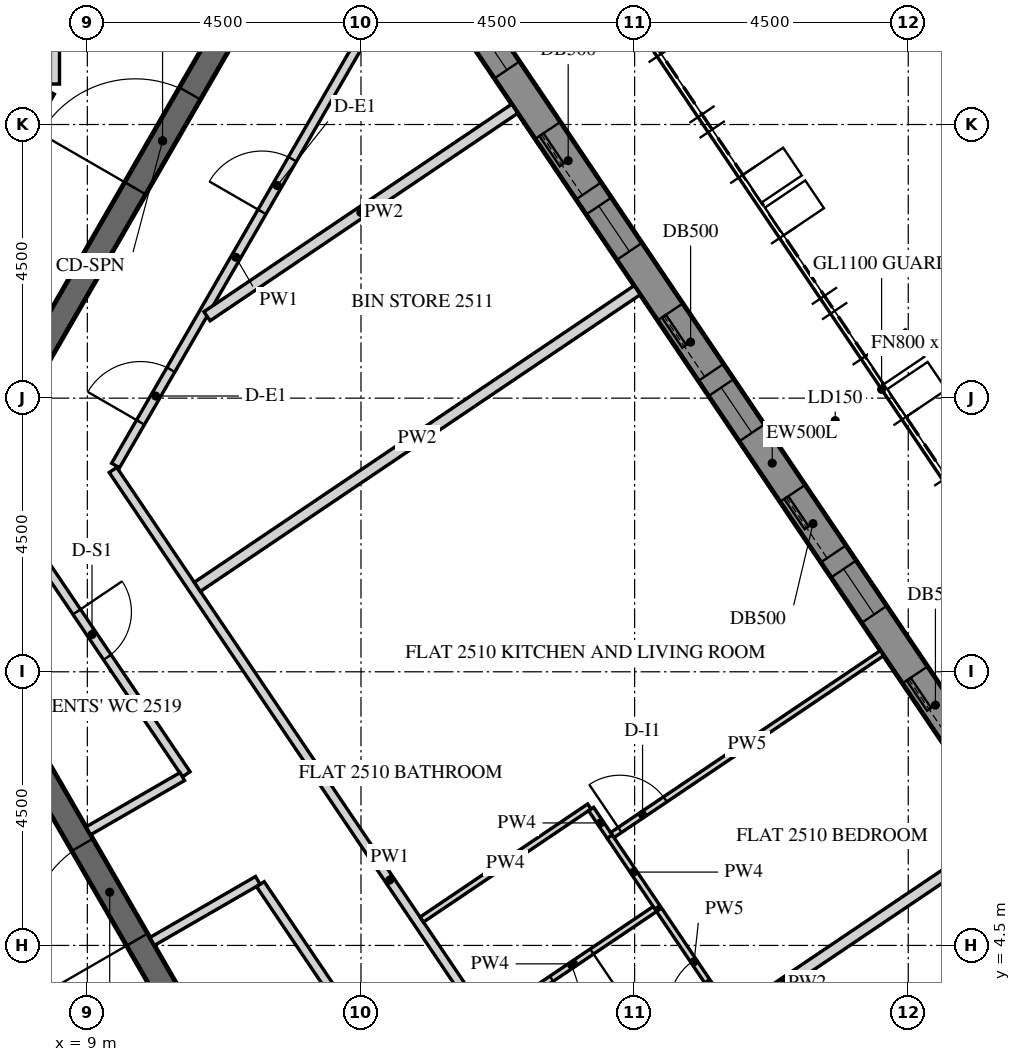
"""IFC4 building model, lengths in metres.
Left out: names, types, materials, properties, quantities, classifications, styles, units other than length and angle.
Written with IfcOpenShell. Run it as: python <this file> out.ifc"""

import sys

from ifc_helpers import new_model, si_unit, direction, frame, frame_2d, origin, place, context, subcontext, project, spatial, polyline, rectangle, outline, extrude, element, fill, save


model = new_model("IFC4")
c1 = context("Model", 3, precision=1e-05, world=origin(), true_north=direction((0.0, 1.0)))
c2 = subcontext(c1, "Body", "Model", "MODEL_VIEW")
j1 = project(units=[si_unit("LENGTHUNIT", "METRE"), si_unit("PLANEANGLEUNIT", "RADIAN")], contexts=[c1])
p1 = place(None, origin())
s1 = spatial("IfcSite", under=j1, at=p1, CompositionType="ELEMENT")
p2 = place(p1, origin())
s2 = spatial("IfcBuilding", under=s1, at=p2, CompositionType="ELEMENT")
p3 = place(p2, frame((0.0, 0.0, 314.7)))
s3 = spatial("IfcBuildingStorey", under=s2, at=p3, CompositionType="ELEMENT", Elevation=314.7)
p4 = place(p3, frame((26.706, 2.879, -0.15), z_axis=(0.0, 0.0, 1.0), x_axis=(-0.559197891507, 0.829034208061, 0.0)))
e1 = element("IfcWall", 1, at=p4, inside=s3, PredefinedType="SOLIDWALL", context=c2, shape_type="SweptSolid", body=[
    extrude(outline(polyline([(0.25, -0.25), (22.795, -0.25), (23.295, 0.25), (-0.25, 0.25), (0.25, -0.25)])), origin(), (0.0, 0.0, 1.0), 3.9),
])
p5 = place(p4, frame((1.323, 0.0, 1.05)))
e2 = element("IfcOpeningElement", 2, at=p5, cuts=e1, PredefinedType="OPENING", context=c2, shape_type="SweptSolid", body=[
    extrude(rectangle(XDim=0.9, YDim=1.5, at=frame_2d((0.45, 0.75))), frame((0.0, 0.26, 0.0), z_axis=(0.0, -1.0, 0.0), x_axis=(1.0, 0.0, 0.0)), (0.0, 0.0, 1.0), 0.52),
])
p6 = place(p4, frame((2.522, 0.0, 0.15)))
e3 = element("IfcOpeningElement", 3, at=p6, cuts=e1, PredefinedType="OPENING", context=c2, shape_type="SweptSolid", body=[
    extrude(rectangle(XDim=1.2, YDim=2.4, at=frame_2d((0.6, 1.2))), frame((0.0, 0.26, 0.0), z_axis=(0.0, -1.0, 0.0), x_axis=(1.0, 0.0, 0.0)), (0.0, 0.0, 1.0), 0.52),
])
p7 = place(p4, frame((4.922, 0.0, 1.05)))
e4 = element("IfcOpeningElement", 4, at=p7, cuts=e1, PredefinedType="OPENING", context=c2, shape_type="SweptSolid", body=[
    extrude(rectangle(XDim=0.9, YDim=1.5, at=frame_2d((0.45, 0.75))), frame((0.0, 0.26, 0.0), z_axis=(0.0, -1.0, 0.0), x_axis=(1.0, 0.0, 0.0)), (0.0, 0.0, 1.0), 0.52),
])
p8 = place(p4, frame((6.122, 0.0, 0.15)))
e5 = element("IfcOpeningElement", 5, at=p8, cuts=e1, PredefinedType="OPENING", context=c2, shape_type="SweptSolid", body=[
    extrude(rectangle(XDim=1.2, YDim=2.4, at=frame_2d((0.6, 1.2))), frame((0.0, 0.26, 0.0), z_axis=(0.0, -1.0, 0.0), x_axis=(1.0, 0.0, 0.0)), (0.0, 0.0, 1.0), 0.52),
])
p9 = place(p4, frame((8.522, 0.0, 1.05)))
e6 = element("IfcOpeningElement", 6, at=p9, cuts=e1, PredefinedType="OPENING", context=c2, shape_type="SweptSolid", body=[
    extrude(rectangle(XDim=0.9, YDim=1.5, at=frame_2d((0.45, 0.75))), frame((0.0, 0.26, 0.0), z_axis=(0.0, -1.0, 0.0), x_axis=(1.0, 0.0, 0.0)), (0.0, 0.0, 1.0), 0.52),
])
p10 = place(p4, frame((9.722, 0.0, 0.15)))
e7 = element("IfcOpeningElement", 7, at=p10, cuts=e1, PredefinedType="OPENING", context=c2, shape_type="SweptSolid", body=[
    extrude(rectangle(XDim=1.2, YDim=2.4, at=frame_2d((0.6, 1.2))), frame((0.0, 0.26, 0.0), z_axis=(0.0, -1.0, 0.0), x_axis=(1.0, 0.0, 0.0)), (0.0, 0.0, 1.0), 0.52),
])
p11 = place(p4, frame((12.122, 0.0, 1.05)))
e8 = element("IfcOpeningElement", 8, at=p11, cuts=e1, PredefinedType="OPENING", context=c2, shape_type="SweptSolid", body=[
    extrude(rectangle(XDim=0.9, YDim=1.5, at=frame_2d((0.45, 0.75))), frame((0.0, 0.26, 0.0), z_axis=(0.0, -1.0, 0.0), x_axis=(1.0, 0.0, 0.0)), (0.0, 0.0, 1.0), 0.52),
])
p12 = place(p4, frame((13.323, 0.0, 0.15)))
e9 = element("IfcOpeningElement", 9, at=p12, cuts=e1, PredefinedType="OPENING", context=c2, shape_type="SweptSolid", body=[
    extrude(rectangle(XDim=1.2, YDim=2.4, at=frame_2d((0.6, 1.2))), frame((0.0, 0.26, 0.0), z_axis=(0.0, -1.0, 0.0), x_axis=(1.0, 0.0, 0.0)), (0.0, 0.0, 1.0), 0.52),
])
p13 = place(p4, frame((15.722, 0.0, 1.05)))
e10 = element("IfcOpeningElement", 10, at=p13, cuts=e1, PredefinedType="OPENING", context=c2, shape_type="SweptSolid", body=[
    extrude(rectangle(XDim=0.9, YDim=1.5, at=frame_2d((0.45, 0.75))), frame((0.0, 0.26, 0.0), z_axis=(0.0, -1.0, 0.0), x_axis=(1.0, 0.0, 0.0)), (0.0, 0.0, 1.0), 0.52),
])
p14 = place(p4, frame((16.922, 0.0, 0.15)))
e11 = element("IfcOpeningElement", 11, at=p14, cuts=e1, PredefinedType="OPENING", context=c2, shape_type="SweptSolid", body=[
    extrude(rectangle(XDim=1.2, YDim=2.4, at=frame_2d((0.6, 1.2))), frame((0.0, 0.26, 0.0), z_axis=(0.0, -1.0, 0.0), x_axis=(1.0, 0.0, 0.0)), (0.0, 0.0, 1.0), 0.52),
])
p15 = place(p4, frame((19.323, 0.0, 1.05)))
e12 = element("IfcOpeningElement", 12, at=p15, cuts=e1, PredefinedType="OPENING", context=c2, shape_type="SweptSolid", body=[
    extrude(rectangle(XDim=0.9, YDim=1.5, at=frame_2d((0.45, 0.75))), frame((0.0, 0.26, 0.0), z_axis=(0.0, -1.0, 0.0), x_axis=(1.0, 0.0, 0.0)), (0.0, 0.0, 1.0), 0.52),
])
p16 = place(p4, frame((20.522, 0.0, 0.15)))
e13 = element("IfcOpeningElement", 13, at=p16, cuts=e1, PredefinedType="OPENING", context=c2, shape_type="SweptSolid", body=[
    extrude(rectangle(XDim=1.2, YDim=2.4, at=frame_2d((0.6, 1.2))), frame((0.0, 0.26, 0.0), z_axis=(0.0, -1.0, 0.0), x_axis=(1.0, 0.0, 0.0)), (0.0, 0.0, 1.0), 0.52),
])
p17 = place(p3, frame((12.471, 0.0, -0.15), z_axis=(0.0, 0.0, 1.0), x_axis=(-0.499996419489, 0.866027470984, 0.0)))
e14 = element("IfcWall", 14, at=p17, inside=s3, PredefinedType="SHEAR", context=c2, shape_type="SweptSolid", body=[
    extrude(outline(polyline([(-0.115, -0.2), (12.586, -0.2), (12.355, 0.2), (0.115, 0.2), (-0.115, -0.2)])), origin(), (0.0, 0.0, 1.0), 3.9),
])
p18 = place(p17, frame((5.306, 0.0, 0.15)))
e15 = element("IfcOpeningElement", 15, at=p18, cuts=e14, PredefinedType="OPENING", context=c2, shape_type="SweptSolid", body=[
    extrude(rectangle(XDim=1.8, YDim=2.4, at=frame_2d((0.9, 1.2))), frame((0.0, 0.21, 0.0), z_axis=(0.0, -1.0, 0.0), x_axis=(1.0, 0.0, 0.0)), (0.0, 0.0, 1.0), 0.42),
])
p19 = place(p3, frame((6.351, 11.0, -0.15), z_axis=(0.0, 0.0, 1.0), x_axis=(0.499998894578, 0.866026041999, 0.0)))
e16 = element("IfcWall", 16, at=p19, inside=s3, PredefinedType="SHEAR", context=c2, shape_type="SweptSolid", body=[
    extrude(rectangle(XDim=15.544, YDim=0.4, at=frame_2d((7.772, 0.0))), origin(), (0.0, 0.0, 1.0), 3.9),
])
p20 = place(p19, frame((6.872, 0.0, 0.15)))
e17 = element("IfcOpeningElement", 17, at=p20, cuts=e16, PredefinedType="OPENING", context=c2, shape_type="SweptSolid", body=[
    extrude(rectangle(XDim=1.8, YDim=2.4, at=frame_2d((0.9, 1.2))), frame((0.0, 0.21, 0.0), z_axis=(0.0, -1.0, 0.0), x_axis=(1.0, 0.0, 0.0)), (0.0, 0.0, 1.0), 0.42),
])
p21 = place(p3, frame((8.467, 20.425, 0.0), z_axis=(0.0, 0.0, 1.0), x_axis=(0.0, -1.0, 0.0)))
e18 = element("IfcWall", 18, at=p21, inside=s3, PredefinedType="PARTITIONING", context=c2, shape_type="SweptSolid", body=[
    extrude(rectangle(XDim=1.76, YDim=0.15, at=frame_2d((0.88, 0.0))), origin(), (0.0, 0.0, 1.0), 2.988),
])
p22 = place(p3, frame((8.392, 18.536, 0.0), z_axis=(0.0, 0.0, 1.0), x_axis=(-0.49996389635, -0.866046247233, 0.0)))
e19 = element("IfcWall", 19, at=p22, inside=s3, PredefinedType="PARTITIONING", context=c2, shape_type="SweptSolid", body=[
    extrude(rectangle(XDim=2.918, YDim=0.15, at=frame_2d((1.459, 0.0))), origin(), (0.0, 0.0, 1.0), 2.988),
])
p23 = place(p3, frame((18.521, -1.171, 0.0), z_axis=(0.0, 0.0, 1.0), x_axis=(-0.559193232449, 0.829037350656, 0.0)))
e20 = element("IfcWall", 20, at=p23, inside=s3, PredefinedType="PARTITIONING", context=c2, shape_type="SweptSolid", body=[
    extrude(rectangle(XDim=16.272, YDim=0.15, at=frame_2d((8.136, 0.0))), origin(), (0.0, 0.0, 1.0), 2.988),
])
p24 = place(p23, frame((3.703, 0.0, 0.0)))
e21 = element("IfcOpeningElement", 21, at=p24, cuts=e20, PredefinedType="OPENING", context=c2, shape_type="SweptSolid", body=[
    extrude(rectangle(XDim=1.0, YDim=2.1, at=frame_2d((0.5, 1.05))), frame((0.0, 0.085, 0.0), z_axis=(0.0, -1.0, 0.0), x_axis=(1.0, 0.0, 0.0)), (0.0, 0.0, 1.0), 0.17),
])
p25 = place(p3, frame((9.464, 12.392, 0.0), z_axis=(0.0, 0.0, 1.0), x_axis=(0.499999400414, 0.866025749955, 0.0)))
e22 = element("IfcWall", 22, at=p25, inside=s3, PredefinedType="PARTITIONING", context=c2, shape_type="SweptSolid", body=[
    extrude(rectangle(XDim=7.911, YDim=0.15, at=frame_2d((3.955, 0.0))), origin(), (0.0, 0.0, 1.0), 2.988),
])
p26 = place(p25, frame((0.82, 0.0, 0.0)))
e23 = element("IfcOpeningElement", 23, at=p26, cuts=e22, PredefinedType="OPENING", context=c2, shape_type="SweptSolid", body=[
    extrude(rectangle(XDim=1.0, YDim=2.1, at=frame_2d((0.5, 1.05))), frame((0.0, 0.085, 0.0), z_axis=(0.0, -1.0, 0.0), x_axis=(1.0, 0.0, 0.0)), (0.0, 0.0, 1.0), 0.17),
])
p27 = place(p25, frame((4.817, 0.0, 0.0)))
e24 = element("IfcOpeningElement", 24, at=p27, cuts=e22, PredefinedType="OPENING", context=c2, shape_type="SweptSolid", body=[
    extrude(rectangle(XDim=1.0, YDim=2.1, at=frame_2d((0.5, 1.05))), frame((0.0, 0.085, 0.0), z_axis=(0.0, -1.0, 0.0), x_axis=(1.0, 0.0, 0.0)), (0.0, 0.0, 1.0), 0.17),
])
p28 = place(p3, frame((10.066, 4.566, 0.0), z_axis=(0.0, 0.0, 1.0), x_axis=(0.866033651025, 0.499985715088, 0.0)))
e25 = element("IfcWall", 25, at=p28, inside=s3, PredefinedType="PARTITIONING", context=c2, shape_type="SweptSolid", body=[
    extrude(rectangle(XDim=2.007, YDim=0.15, at=frame_2d((1.003, 0.0))), origin(), (0.0, 0.0, 1.0), 2.988),
])
p29 = place(p3, frame((11.846, 5.507, 0.0), z_axis=(0.0, 0.0, 1.0), x_axis=(0.559204754045, -0.829029579119, 0.0)))
e26 = element("IfcWall", 26, at=p29, inside=s3, PredefinedType="PARTITIONING", context=c2, shape_type="SweptSolid", body=[
    extrude(rectangle(XDim=8.228, YDim=0.15, at=frame_2d((4.114, 0.0))), origin(), (0.0, 0.0, 1.0), 2.988),
])
p30 = place(p29, frame((3.664, 0.0, 0.0)))
e27 = element("IfcOpeningElement", 27, at=p30, cuts=e26, PredefinedType="OPENING", context=c2, shape_type="SweptSolid", body=[
    extrude(rectangle(XDim=0.9, YDim=2.1, at=frame_2d((0.45, 1.05))), frame((0.0, 0.085, 0.0), z_axis=(0.0, -1.0, 0.0), x_axis=(1.0, 0.0, 0.0)), (0.0, 0.0, 1.0), 0.17),
])
p31 = place(p3, frame((7.527, 11.91, 0.0), z_axis=(0.0, 0.0, 1.0), x_axis=(0.5592050336, -0.82902939055, 0.0)))
e28 = element("IfcWall", 28, at=p31, inside=s3, PredefinedType="PARTITIONING", context=c2, shape_type="SweptSolid", body=[
    extrude(rectangle(XDim=5.543, YDim=0.15, at=frame_2d((2.771, 0.0))), origin(), (0.0, 0.0, 1.0), 2.988),
])
p32 = place(p31, frame((2.322, 0.0, 0.0)))
e29 = element("IfcOpeningElement", 29, at=p32, cuts=e28, PredefinedType="OPENING", context=c2, shape_type="SweptSolid", body=[
    extrude(rectangle(XDim=0.9, YDim=2.1, at=frame_2d((0.45, 1.05))), frame((0.0, 0.085, 0.0), z_axis=(0.0, -1.0, 0.0), x_axis=(1.0, 0.0, 0.0)), (0.0, 0.0, 1.0), 0.17),
])
p33 = place(p3, frame((10.562, 7.277, 0.0), z_axis=(0.0, 0.0, 1.0), x_axis=(-0.86601248742, -0.500022371132, 0.0)))
e30 = element("IfcWall", 30, at=p33, inside=s3, PredefinedType="PARTITIONING", context=c2, shape_type="SweptSolid", body=[
    extrude(rectangle(XDim=1.785, YDim=0.15, at=frame_2d((0.893, 0.0))), origin(), (0.0, 0.0, 1.0), 2.988),
])
p34 = place(p3, frame((24.082, 6.323, 0.0), z_axis=(0.0, 0.0, 1.0), x_axis=(-0.829028989438, -0.559205628254, 0.0)))
e31 = element("IfcWall", 31, at=p34, inside=s3, PredefinedType="PARTITIONING", context=c2, shape_type="SweptSolid", body=[
    extrude(rectangle(XDim=8.725, YDim=0.18, at=frame_2d((4.363, 0.0))), origin(), (0.0, 0.0, 1.0), 2.988),
])
p35 = place(p3, frame((14.5, 4.926, 0.0), z_axis=(0.0, 0.0, 1.0), x_axis=(0.829067379225, 0.559148710725, 0.0)))
e32 = element("IfcWall", 32, at=p35, inside=s3, PredefinedType="PARTITIONING", context=c2, shape_type="SweptSolid", body=[
    extrude(rectangle(XDim=3.325, YDim=0.1, at=frame_2d((1.663, 0.0))), origin(), (0.0, 0.0, 1.0), 2.988),
])
p36 = place(p3, frame((17.284, 6.743, 0.0), z_axis=(0.0, 0.0, 1.0), x_axis=(0.55897906803, -0.829181766263, 0.0)))
e33 = element("IfcWall", 33, at=p36, inside=s3, PredefinedType="PARTITIONING", context=c2, shape_type="SweptSolid", body=[
    extrude(rectangle(XDim=0.552, YDim=0.1, at=frame_2d((0.276, 0.0))), origin(), (0.0, 0.0, 1.0), 2.988),
])
p37 = place(p3, frame((17.633, 6.315, 0.0), z_axis=(0.0, 0.0, 1.0), x_axis=(0.82904753069, 0.559178139645, 0.0)))
e34 = element("IfcWall", 34, at=p37, inside=s3, PredefinedType="PARTITIONING", context=c2, shape_type="SweptSolid", body=[
    extrude(rectangle(XDim=5.35, YDim=0.1, at=frame_2d((2.675, 0.0))), origin(), (0.0, 0.0, 1.0), 2.988),
])
p38 = place(p37, frame((0.15, 0.0, 0.0)))
e35 = element("IfcOpeningElement", 35, at=p38, cuts=e34, PredefinedType="OPENING", context=c2, shape_type="SweptSolid", body=[
    extrude(rectangle(XDim=0.9, YDim=2.1, at=frame_2d((0.45, 1.05))), frame((0.0, 0.06, 0.0), z_axis=(0.0, -1.0, 0.0), x_axis=(1.0, 0.0, 0.0)), (0.0, 0.0, 1.0), 0.12),
])
p39 = place(p3, frame((18.042, 15.276, 0.0), z_axis=(0.0, 0.0, 1.0), x_axis=(-0.829028989438, -0.559205628254, 0.0)))
e36 = element("IfcWall", 36, at=p39, inside=s3, PredefinedType="PARTITIONING", context=c2, shape_type="SweptSolid", body=[
    extrude(rectangle(XDim=8.725, YDim=0.18, at=frame_2d((4.363, 0.0))), origin(), (0.0, 0.0, 1.0), 2.988),
])
p40 = place(p3, frame((18.375, 5.127, 0.0), z_axis=(0.0, 0.0, 1.0), x_axis=(-0.82903334026, -0.559199178055, 0.0)))
e37 = element("IfcWall", 37, at=p40, inside=s3, PredefinedType="PARTITIONING", context=c2, shape_type="SweptSolid", body=[
    extrude(rectangle(XDim=3.325, YDim=0.1, at=frame_2d((1.663, 0.0))), origin(), (0.0, 0.0, 1.0), 2.988),
])
p41 = place(p40, frame((1.3, 0.0, 0.0)))
e38 = element("IfcOpeningElement", 38, at=p41, cuts=e37, PredefinedType="OPENING", context=c2, shape_type="SweptSolid", body=[
    extrude(rectangle(XDim=0.8, YDim=2.1, at=frame_2d((0.4, 1.05))), frame((0.0, 0.06, 0.0), z_axis=(0.0, -1.0, 0.0), x_axis=(1.0, 0.0, 0.0)), (0.0, 0.0, 1.0), 0.12),
])
p42 = place(p3, frame((19.554, 3.377, 0.0), z_axis=(0.0, 0.0, 1.0), x_axis=(-0.559200338399, 0.829032557584, 0.0)))
e39 = element("IfcWall", 39, at=p42, inside=s3, PredefinedType="PARTITIONING", context=c2, shape_type="SweptSolid", body=[
    extrude(rectangle(XDim=2.062, YDim=0.1, at=frame_2d((1.031, 0.0))), origin(), (0.0, 0.0, 1.0), 2.988),
])
p43 = place(p42, frame((0.15, 0.0, 0.0)))
e40 = element("IfcOpeningElement", 40, at=p43, cuts=e39, PredefinedType="OPENING", context=c2, shape_type="SweptSolid", body=[
    extrude(rectangle(XDim=0.9, YDim=2.1, at=frame_2d((0.45, 1.05))), frame((0.0, 0.06, 0.0), z_axis=(0.0, -1.0, 0.0), x_axis=(1.0, 0.0, 0.0)), (0.0, 0.0, 1.0), 0.12),
])
p44 = place(p3, frame((18.376, 5.125, 0.0), z_axis=(0.0, 0.0, 1.0), x_axis=(-0.559152802616, 0.829064619512, 0.0)))
e41 = element("IfcWall", 41, at=p44, inside=s3, PredefinedType="PARTITIONING", context=c2, shape_type="SweptSolid", body=[
    extrude(rectangle(XDim=1.402, YDim=0.1, at=frame_2d((0.701, 0.0))), origin(), (0.0, 0.0, 1.0), 2.988),
])
p45 = place(p3, frame((16.029, 18.26, 0.0), z_axis=(0.0, 0.0, 1.0), x_axis=(-0.829048418375, -0.559176823545, 0.0)))
e42 = element("IfcWall", 42, at=p45, inside=s3, PredefinedType="PARTITIONING", context=c2, shape_type="SweptSolid", body=[
    extrude(rectangle(XDim=6.105, YDim=0.18, at=frame_2d((3.053, 0.0))), origin(), (0.0, 0.0, 1.0), 2.988),
])
p46 = place(p8, frame((0.0, 0.175, 0.0)))
e43 = element("IfcDoor", 43, at=p46, inside=s3, OperationType="SLIDING_TO_LEFT", PredefinedType="DOOR", context=c2, shape_type="SweptSolid", body=[
    extrude(rectangle(XDim=1.2, YDim=2.4, at=frame_2d((0.6, 1.2))), frame((0.0, 0.025, 0.0), z_axis=(0.0, -1.0, 0.0), x_axis=(1.0, 0.0, 0.0)), (0.0, 0.0, 1.0), 0.05),
])
fill(e5, e43)
p47 = place(p9, frame((0.0, 0.18, 0.0)))
e44 = element("IfcWindow", 44, at=p47, inside=s3, PartitioningType="SINGLE_PANEL", PredefinedType="WINDOW", context=c2, shape_type="SweptSolid", body=[
    extrude(rectangle(XDim=0.9, YDim=1.5, at=frame_2d((0.45, 0.75))), frame((0.0, 0.03, 0.0), z_axis=(0.0, -1.0, 0.0), x_axis=(1.0, 0.0, 0.0)), (0.0, 0.0, 1.0), 0.06),
])
fill(e6, e44)
p48 = place(p10, frame((0.0, 0.175, 0.0)))
e45 = element("IfcDoor", 45, at=p48, inside=s3, OperationType="SLIDING_TO_LEFT", PredefinedType="DOOR", context=c2, shape_type="SweptSolid", body=[
    extrude(rectangle(XDim=1.2, YDim=2.4, at=frame_2d((0.6, 1.2))), frame((0.0, 0.025, 0.0), z_axis=(0.0, -1.0, 0.0), x_axis=(1.0, 0.0, 0.0)), (0.0, 0.0, 1.0), 0.05),
])
fill(e7, e45)
p49 = place(p11, frame((0.0, 0.18, 0.0)))
e46 = element("IfcWindow", 46, at=p49, inside=s3, PartitioningType="SINGLE_PANEL", PredefinedType="WINDOW", context=c2, shape_type="SweptSolid", body=[
    extrude(rectangle(XDim=0.9, YDim=1.5, at=frame_2d((0.45, 0.75))), frame((0.0, 0.03, 0.0), z_axis=(0.0, -1.0, 0.0), x_axis=(1.0, 0.0, 0.0)), (0.0, 0.0, 1.0), 0.06),
])
fill(e8, e46)
p50 = place(p12, frame((0.0, 0.175, 0.0)))
e47 = element("IfcDoor", 47, at=p50, inside=s3, OperationType="SLIDING_TO_LEFT", PredefinedType="DOOR", context=c2, shape_type="SweptSolid", body=[
    extrude(rectangle(XDim=1.2, YDim=2.4, at=frame_2d((0.6, 1.2))), frame((0.0, 0.025, 0.0), z_axis=(0.0, -1.0, 0.0), x_axis=(1.0, 0.0, 0.0)), (0.0, 0.0, 1.0), 0.05),
])
fill(e9, e47)
p51 = place(p13, frame((0.0, 0.18, 0.0)))
e48 = element("IfcWindow", 48, at=p51, inside=s3, PartitioningType="SINGLE_PANEL", PredefinedType="WINDOW", context=c2, shape_type="SweptSolid", body=[
    extrude(rectangle(XDim=0.9, YDim=1.5, at=frame_2d((0.45, 0.75))), frame((0.0, 0.03, 0.0), z_axis=(0.0, -1.0, 0.0), x_axis=(1.0, 0.0, 0.0)), (0.0, 0.0, 1.0), 0.06),
])
fill(e10, e48)
p52 = place(p14, frame((0.0, 0.175, 0.0)))
e49 = element("IfcDoor", 49, at=p52, inside=s3, OperationType="SLIDING_TO_LEFT", PredefinedType="DOOR", context=c2, shape_type="SweptSolid", body=[
    extrude(rectangle(XDim=1.2, YDim=2.4, at=frame_2d((0.6, 1.2))), frame((0.0, 0.025, 0.0), z_axis=(0.0, -1.0, 0.0), x_axis=(1.0, 0.0, 0.0)), (0.0, 0.0, 1.0), 0.05),
])
fill(e11, e49)
p53 = place(p15, frame((0.0, 0.18, 0.0)))
e50 = element("IfcWindow", 50, at=p53, inside=s3, PartitioningType="SINGLE_PANEL", PredefinedType="WINDOW", context=c2, shape_type="SweptSolid", body=[
    extrude(rectangle(XDim=0.9, YDim=1.5, at=frame_2d((0.45, 0.75))), frame((0.0, 0.03, 0.0), z_axis=(0.0, -1.0, 0.0), x_axis=(1.0, 0.0, 0.0)), (0.0, 0.0, 1.0), 0.06),
])
fill(e12, e50)
p54 = place(p18, origin())
e51 = element("IfcDoor", 51, at=p54, inside=s3, OperationType="DOUBLE_DOOR_SINGLE_SWING", PredefinedType="DOOR", context=c2, shape_type="SweptSolid", body=[
    extrude(rectangle(XDim=1.8, YDim=2.4, at=frame_2d((0.9, 1.2))), frame((0.0, 0.025, 0.0), z_axis=(0.0, -1.0, 0.0), x_axis=(1.0, 0.0, 0.0)), (0.0, 0.0, 1.0), 0.05),
])
fill(e15, e51)
p55 = place(p20, origin())
e52 = element("IfcDoor", 52, at=p55, inside=s3, OperationType="DOUBLE_DOOR_SINGLE_SWING", PredefinedType="DOOR", context=c2, shape_type="SweptSolid", body=[
    extrude(rectangle(XDim=1.8, YDim=2.4, at=frame_2d((0.9, 1.2))), frame((0.0, 0.025, 0.0), z_axis=(0.0, -1.0, 0.0), x_axis=(1.0, 0.0, 0.0)), (0.0, 0.0, 1.0), 0.05),
])
fill(e17, e52)
p56 = place(p41, origin())
e53 = element("IfcDoor", 53, at=p56, inside=s3, OperationType="SINGLE_SWING_LEFT", PredefinedType="DOOR", context=c2, shape_type="SweptSolid", body=[
    extrude(rectangle(XDim=0.8, YDim=2.1, at=frame_2d((0.4, 1.05))), frame((0.0, 0.025, 0.0), z_axis=(0.0, -1.0, 0.0), x_axis=(1.0, 0.0, 0.0)), (0.0, 0.0, 1.0), 0.05),
])
fill(e38, e53)
p57 = place(p43, origin())
e54 = element("IfcDoor", 54, at=p57, inside=s3, OperationType="SINGLE_SWING_LEFT", PredefinedType="DOOR", context=c2, shape_type="SweptSolid", body=[
    extrude(rectangle(XDim=0.9, YDim=2.1, at=frame_2d((0.45, 1.05))), frame((0.0, 0.025, 0.0), z_axis=(0.0, -1.0, 0.0), x_axis=(1.0, 0.0, 0.0)), (0.0, 0.0, 1.0), 0.05),
])
fill(e40, e54)
p58 = place(p38, origin())
e55 = element("IfcDoor", 55, at=p58, inside=s3, OperationType="SINGLE_SWING_RIGHT", PredefinedType="DOOR", context=c2, shape_type="SweptSolid", body=[
    extrude(rectangle(XDim=0.9, YDim=2.1, at=frame_2d((0.45, 1.05))), frame((0.0, 0.025, 0.0), z_axis=(0.0, -1.0, 0.0), x_axis=(1.0, 0.0, 0.0)), (0.0, 0.0, 1.0), 0.05),
])
fill(e35, e55)
p59 = place(p26, origin())
e56 = element("IfcDoor", 56, at=p59, inside=s3, OperationType="SINGLE_SWING_RIGHT", PredefinedType="DOOR", context=c2, shape_type="SweptSolid", body=[
    extrude(rectangle(XDim=1.0, YDim=2.1, at=frame_2d((0.5, 1.05))), frame((0.0, 0.025, 0.0), z_axis=(0.0, -1.0, 0.0), x_axis=(1.0, 0.0, 0.0)), (0.0, 0.0, 1.0), 0.05),
])
fill(e23, e56)
p60 = place(p27, origin())
e57 = element("IfcDoor", 57, at=p60, inside=s3, OperationType="SINGLE_SWING_LEFT", PredefinedType="DOOR", context=c2, shape_type="SweptSolid", body=[
    extrude(rectangle(XDim=1.0, YDim=2.1, at=frame_2d((0.5, 1.05))), frame((0.0, 0.025, 0.0), z_axis=(0.0, -1.0, 0.0), x_axis=(1.0, 0.0, 0.0)), (0.0, 0.0, 1.0), 0.05),
])
fill(e24, e57)
p61 = place(p32, origin())
e58 = element("IfcDoor", 58, at=p61, inside=s3, OperationType="SINGLE_SWING_RIGHT", PredefinedType="DOOR", context=c2, shape_type="SweptSolid", body=[
    extrude(rectangle(XDim=0.9, YDim=2.1, at=frame_2d((0.45, 1.05))), frame((0.0, 0.025, 0.0), z_axis=(0.0, -1.0, 0.0), x_axis=(1.0, 0.0, 0.0)), (0.0, 0.0, 1.0), 0.05),
])
fill(e29, e58)
save(model, sys.argv[1])
